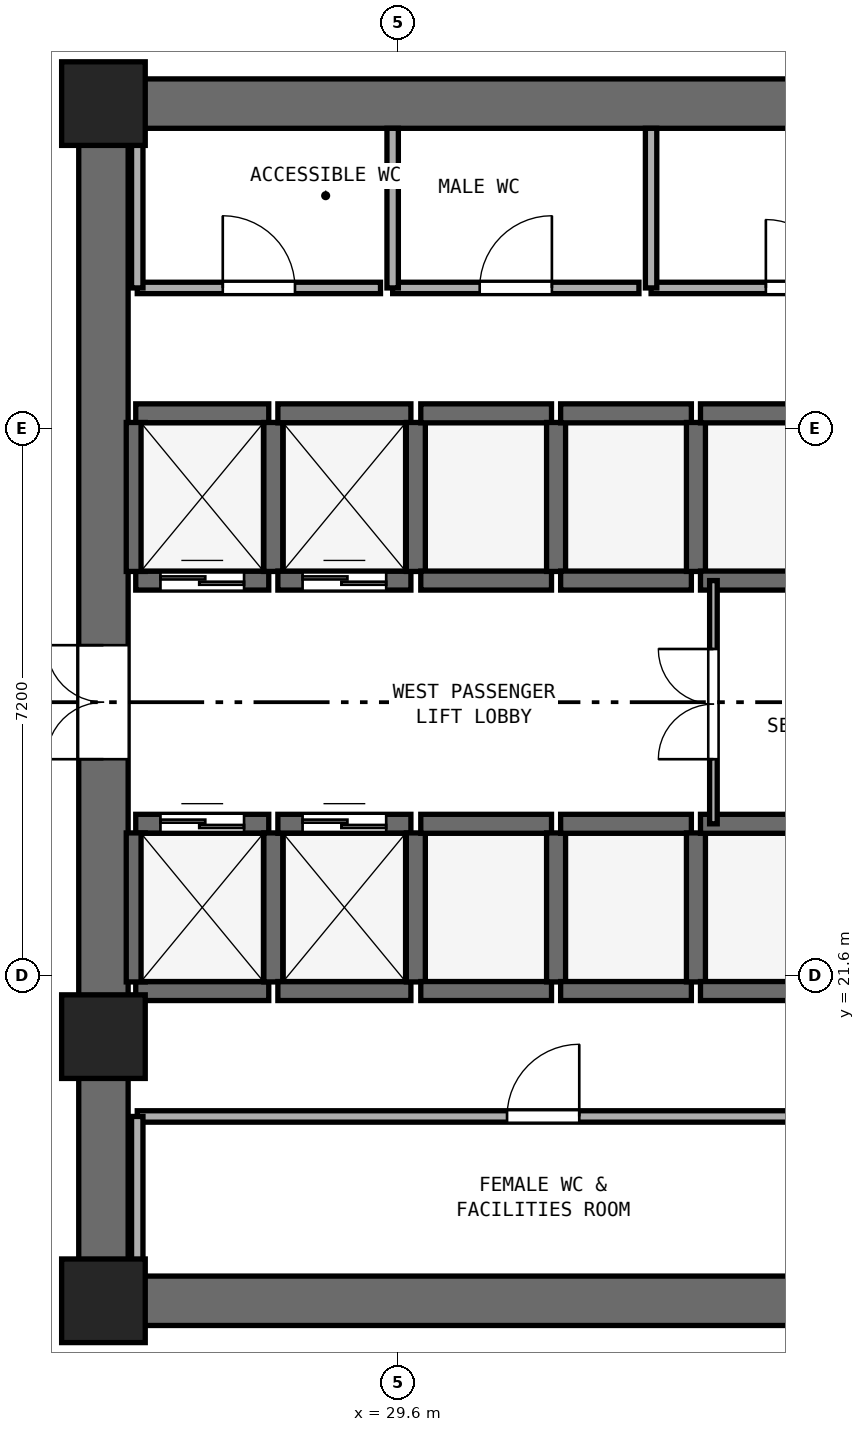
"""IFC4 building model, lengths in metres.
Left out: names, types, materials, properties, quantities, classifications, styles, units other than length and angle.
Written with IfcOpenShell. Run it as: python <this file> out.ifc"""

import sys

from ifc_helpers import new_model, si_unit, direction, frame, frame_2d, origin, origin_2d, place, context, subcontext, project, spatial, rectangle, extrude, element, fill, save


model = new_model("IFC4")
c1 = context("Model", 3, precision=1e-05, world=origin(), true_north=direction((0.0, 1.0)))
c2 = subcontext(c1, "Body", "Model", "MODEL_VIEW")
j1 = project(units=[si_unit("LENGTHUNIT", "METRE"), si_unit("PLANEANGLEUNIT", "RADIAN")], contexts=[c1])
p1 = place(None, origin())
s1 = spatial("IfcSite", under=j1, at=p1, CompositionType="ELEMENT")
p2 = place(p1, origin())
s2 = spatial("IfcBuilding", under=s1, at=p2, CompositionType="ELEMENT")
p3 = place(p2, frame((0.0, 0.0, 47.8)))
s3 = spatial("IfcBuildingStorey", under=s2, at=p3, CompositionType="ELEMENT", Elevation=47.8)
for number, where, z_axis, x_axis in (
    (1, (25.4, 17.325, 0.0), (0.0, 0.0, 1.0), (1.0, 0.0, 0.0)),
    (2, (25.4, 33.075, 0.0), (0.0, 0.0, 1.0), (1.0, 0.0, 0.0)),
):
    element("IfcWall", number, at=place(p3, frame(where, z_axis=z_axis, x_axis=x_axis)), inside=s3, PredefinedType="SHEAR", context=c2, shape_type="SweptSolid", body=[
        extrude(rectangle(XDim=23.2, YDim=0.65, at=frame_2d((11.6, 0.0))), origin(), (0.0, 0.0, 1.0), 3.525),
    ])
p4 = place(p3, frame((25.725, 17.65, 0.0), z_axis=(0.0, 0.0, 1.0), x_axis=(0.0, 1.0, 0.0)))
e3 = element("IfcWall", 3, at=p4, inside=s3, PredefinedType="SHEAR", context=c2, shape_type="SweptSolid", body=[
    extrude(rectangle(XDim=15.1, YDim=0.65, at=frame_2d((7.55, 0.0))), origin(), (0.0, 0.0, 1.0), 3.525),
])
p5 = place(p4, frame((6.8, 0.0, 0.0)))
e4 = element("IfcOpeningElement", 4, at=p5, cuts=e3, PredefinedType="OPENING", context=c2, shape_type="SweptSolid", body=[
    extrude(rectangle(XDim=1.5, YDim=2.15, at=frame_2d((0.75, 1.075))), frame((0.0, 0.335, 0.0), z_axis=(0.0, -1.0, 0.0), x_axis=(1.0, 0.0, 0.0)), (0.0, 0.0, 1.0), 0.67),
])
for number, where, z_axis, x_axis in (
    (5, (25.725, 17.325, 0.0), (0.0, 0.0, 1.0), (1.0, 0.0, 0.0)),
    (6, (25.725, 33.075, 0.0), (0.0, 0.0, 1.0), (1.0, 0.0, 0.0)),
    (7, (25.725, 20.8, 0.0), (0.0, 0.0, 1.0), (1.0, 0.0, 0.0)),
):
    element("IfcColumn", number, at=place(p3, frame(where, z_axis=z_axis, x_axis=x_axis)), inside=s3, PredefinedType="PILASTER", context=c2, shape_type="SweptSolid", body=[
        extrude(rectangle(XDim=1.1, YDim=1.1, at=origin_2d()), origin(), (0.0, 0.0, 1.0), 3.8),
    ])
p6 = place(p3, frame((26.15, 26.8, 0.0), z_axis=(0.0, 0.0, 1.0), x_axis=(1.0, 0.0, 0.0)))
e8 = element("IfcWall", 8, at=p6, inside=s3, PredefinedType="SHEAR", context=c2, shape_type="SweptSolid", body=[
    extrude(rectangle(XDim=1.75, YDim=0.25, at=frame_2d((0.875, 0.0))), origin(), (0.0, 0.0, 1.0), 3.525),
])
p7 = place(p6, frame((0.325, 0.0, 0.0)))
e9 = element("IfcOpeningElement", 9, at=p7, cuts=e8, PredefinedType="OPENING", context=c2, shape_type="SweptSolid", body=[
    extrude(rectangle(XDim=1.1, YDim=2.15, at=frame_2d((0.55, 1.075))), frame((0.0, 0.135, 0.0), z_axis=(0.0, -1.0, 0.0), x_axis=(1.0, 0.0, 0.0)), (0.0, 0.0, 1.0), 0.27),
])
p8 = place(p3, frame((26.15, 29.0, 0.0), z_axis=(0.0, 0.0, 1.0), x_axis=(1.0, 0.0, 0.0)))
e10 = element("IfcWall", 10, at=p8, inside=s3, PredefinedType="SHEAR", context=c2, shape_type="SweptSolid", body=[
    extrude(rectangle(XDim=1.75, YDim=0.25, at=frame_2d((0.875, 0.0))), origin(), (0.0, 0.0, 1.0), 3.525),
])
for number, where, z_axis, x_axis in (
    (11, (26.15, 26.92, 0.0), (0.0, 0.0, 1.0), (0.0, 1.0, 0.0)),
    (12, (27.96, 26.92, 0.0), (0.0, 0.0, 1.0), (0.0, 1.0, 0.0)),
):
    element("IfcWall", number, at=place(p3, frame(where, z_axis=z_axis, x_axis=x_axis)), inside=s3, PredefinedType="SHEAR", context=c2, shape_type="SweptSolid", body=[
        extrude(rectangle(XDim=1.96, YDim=0.25, at=frame_2d((0.98, 0.0))), origin(), (0.0, 0.0, 1.0), 3.525),
    ])
p9 = place(p3, frame((28.02, 26.8, 0.0), z_axis=(0.0, 0.0, 1.0), x_axis=(1.0, 0.0, 0.0)))
e13 = element("IfcWall", 13, at=p9, inside=s3, PredefinedType="SHEAR", context=c2, shape_type="SweptSolid", body=[
    extrude(rectangle(XDim=1.75, YDim=0.25, at=frame_2d((0.875, 0.0))), origin(), (0.0, 0.0, 1.0), 3.525),
])
p10 = place(p9, frame((0.325, 0.0, 0.0)))
e14 = element("IfcOpeningElement", 14, at=p10, cuts=e13, PredefinedType="OPENING", context=c2, shape_type="SweptSolid", body=[
    extrude(rectangle(XDim=1.1, YDim=2.15, at=frame_2d((0.55, 1.075))), frame((0.0, 0.135, 0.0), z_axis=(0.0, -1.0, 0.0), x_axis=(1.0, 0.0, 0.0)), (0.0, 0.0, 1.0), 0.27),
])
p11 = place(p3, frame((28.02, 29.0, 0.0), z_axis=(0.0, 0.0, 1.0), x_axis=(1.0, 0.0, 0.0)))
e15 = element("IfcWall", 15, at=p11, inside=s3, PredefinedType="SHEAR", context=c2, shape_type="SweptSolid", body=[
    extrude(rectangle(XDim=1.75, YDim=0.25, at=frame_2d((0.875, 0.0))), origin(), (0.0, 0.0, 1.0), 3.525),
])
p12 = place(p3, frame((29.835, 26.92, 0.0), z_axis=(0.0, 0.0, 1.0), x_axis=(0.0, 1.0, 0.0)))
e16 = element("IfcWall", 16, at=p12, inside=s3, PredefinedType="SHEAR", context=c2, shape_type="SweptSolid", body=[
    extrude(rectangle(XDim=1.96, YDim=0.25, at=frame_2d((0.98, 0.0))), origin(), (0.0, 0.0, 1.0), 3.525),
])
p13 = place(p3, frame((26.15, 21.4, 0.0), z_axis=(0.0, 0.0, 1.0), x_axis=(1.0, 0.0, 0.0)))
e17 = element("IfcWall", 17, at=p13, inside=s3, PredefinedType="SHEAR", context=c2, shape_type="SweptSolid", body=[
    extrude(rectangle(XDim=1.75, YDim=0.25, at=frame_2d((0.875, 0.0))), origin(), (0.0, 0.0, 1.0), 3.525),
])
p14 = place(p3, frame((26.15, 23.6, 0.0), z_axis=(0.0, 0.0, 1.0), x_axis=(1.0, 0.0, 0.0)))
e18 = element("IfcWall", 18, at=p14, inside=s3, PredefinedType="SHEAR", context=c2, shape_type="SweptSolid", body=[
    extrude(rectangle(XDim=1.75, YDim=0.25, at=frame_2d((0.875, 0.0))), origin(), (0.0, 0.0, 1.0), 3.525),
])
p15 = place(p14, frame((0.325, 0.0, 0.0)))
e19 = element("IfcOpeningElement", 19, at=p15, cuts=e18, PredefinedType="OPENING", context=c2, shape_type="SweptSolid", body=[
    extrude(rectangle(XDim=1.1, YDim=2.15, at=frame_2d((0.55, 1.075))), frame((0.0, 0.135, 0.0), z_axis=(0.0, -1.0, 0.0), x_axis=(1.0, 0.0, 0.0)), (0.0, 0.0, 1.0), 0.27),
])
for number, where, z_axis, x_axis in (
    (20, (26.15, 21.52, 0.0), (0.0, 0.0, 1.0), (0.0, 1.0, 0.0)),
    (21, (27.96, 21.52, 0.0), (0.0, 0.0, 1.0), (0.0, 1.0, 0.0)),
):
    element("IfcWall", number, at=place(p3, frame(where, z_axis=z_axis, x_axis=x_axis)), inside=s3, PredefinedType="SHEAR", context=c2, shape_type="SweptSolid", body=[
        extrude(rectangle(XDim=1.96, YDim=0.25, at=frame_2d((0.98, 0.0))), origin(), (0.0, 0.0, 1.0), 3.525),
    ])
p16 = place(p3, frame((28.02, 21.4, 0.0), z_axis=(0.0, 0.0, 1.0), x_axis=(1.0, 0.0, 0.0)))
e22 = element("IfcWall", 22, at=p16, inside=s3, PredefinedType="SHEAR", context=c2, shape_type="SweptSolid", body=[
    extrude(rectangle(XDim=1.75, YDim=0.25, at=frame_2d((0.875, 0.0))), origin(), (0.0, 0.0, 1.0), 3.525),
])
p17 = place(p3, frame((28.02, 23.6, 0.0), z_axis=(0.0, 0.0, 1.0), x_axis=(1.0, 0.0, 0.0)))
e23 = element("IfcWall", 23, at=p17, inside=s3, PredefinedType="SHEAR", context=c2, shape_type="SweptSolid", body=[
    extrude(rectangle(XDim=1.75, YDim=0.25, at=frame_2d((0.875, 0.0))), origin(), (0.0, 0.0, 1.0), 3.525),
])
p18 = place(p17, frame((0.325, 0.0, 0.0)))
e24 = element("IfcOpeningElement", 24, at=p18, cuts=e23, PredefinedType="OPENING", context=c2, shape_type="SweptSolid", body=[
    extrude(rectangle(XDim=1.1, YDim=2.15, at=frame_2d((0.55, 1.075))), frame((0.0, 0.135, 0.0), z_axis=(0.0, -1.0, 0.0), x_axis=(1.0, 0.0, 0.0)), (0.0, 0.0, 1.0), 0.27),
])
p19 = place(p3, frame((29.835, 21.52, 0.0), z_axis=(0.0, 0.0, 1.0), x_axis=(0.0, 1.0, 0.0)))
e25 = element("IfcWall", 25, at=p19, inside=s3, PredefinedType="SHEAR", context=c2, shape_type="SweptSolid", body=[
    extrude(rectangle(XDim=1.96, YDim=0.25, at=frame_2d((0.98, 0.0))), origin(), (0.0, 0.0, 1.0), 3.525),
])
for number, where, z_axis, x_axis in (
    (26, (29.9, 21.4, 0.0), (0.0, 0.0, 1.0), (1.0, 0.0, 0.0)),
    (27, (29.9, 23.6, 0.0), (0.0, 0.0, 1.0), (1.0, 0.0, 0.0)),
):
    element("IfcWall", number, at=place(p3, frame(where, z_axis=z_axis, x_axis=x_axis)), inside=s3, PredefinedType="SHEAR", context=c2, shape_type="SweptSolid", body=[
        extrude(rectangle(XDim=1.72, YDim=0.25, at=frame_2d((0.86, 0.0))), origin(), (0.0, 0.0, 1.0), 3.525),
    ])
p20 = place(p3, frame((31.68, 21.52, 0.0), z_axis=(0.0, 0.0, 1.0), x_axis=(0.0, 1.0, 0.0)))
e28 = element("IfcWall", 28, at=p20, inside=s3, PredefinedType="SHEAR", context=c2, shape_type="SweptSolid", body=[
    extrude(rectangle(XDim=1.96, YDim=0.25, at=frame_2d((0.98, 0.0))), origin(), (0.0, 0.0, 1.0), 3.525),
])
for number, where, z_axis, x_axis in (
    (29, (31.74, 21.4, 0.0), (0.0, 0.0, 1.0), (1.0, 0.0, 0.0)),
    (30, (31.74, 23.6, 0.0), (0.0, 0.0, 1.0), (1.0, 0.0, 0.0)),
):
    element("IfcWall", number, at=place(p3, frame(where, z_axis=z_axis, x_axis=x_axis)), inside=s3, PredefinedType="SHEAR", context=c2, shape_type="SweptSolid", body=[
        extrude(rectangle(XDim=1.72, YDim=0.25, at=frame_2d((0.86, 0.0))), origin(), (0.0, 0.0, 1.0), 3.525),
    ])
p21 = place(p3, frame((33.52, 21.52, 0.0), z_axis=(0.0, 0.0, 1.0), x_axis=(0.0, 1.0, 0.0)))
e31 = element("IfcWall", 31, at=p21, inside=s3, PredefinedType="SHEAR", context=c2, shape_type="SweptSolid", body=[
    extrude(rectangle(XDim=1.96, YDim=0.25, at=frame_2d((0.98, 0.0))), origin(), (0.0, 0.0, 1.0), 3.525),
])
for number, where, z_axis, x_axis in (
    (32, (33.58, 21.4, 0.0), (0.0, 0.0, 1.0), (1.0, 0.0, 0.0)),
    (33, (33.58, 23.6, 0.0), (0.0, 0.0, 1.0), (1.0, 0.0, 0.0)),
):
    element("IfcWall", number, at=place(p3, frame(where, z_axis=z_axis, x_axis=x_axis)), inside=s3, PredefinedType="SHEAR", context=c2, shape_type="SweptSolid", body=[
        extrude(rectangle(XDim=1.72, YDim=0.25, at=frame_2d((0.86, 0.0))), origin(), (0.0, 0.0, 1.0), 3.525),
    ])
for number, where, z_axis, x_axis in (
    (34, (29.9, 26.8, 0.0), (0.0, 0.0, 1.0), (1.0, 0.0, 0.0)),
    (35, (29.9, 29.0, 0.0), (0.0, 0.0, 1.0), (1.0, 0.0, 0.0)),
):
    element("IfcWall", number, at=place(p3, frame(where, z_axis=z_axis, x_axis=x_axis)), inside=s3, PredefinedType="SHEAR", context=c2, shape_type="SweptSolid", body=[
        extrude(rectangle(XDim=1.72, YDim=0.25, at=frame_2d((0.86, 0.0))), origin(), (0.0, 0.0, 1.0), 3.525),
    ])
p22 = place(p3, frame((31.68, 26.92, 0.0), z_axis=(0.0, 0.0, 1.0), x_axis=(0.0, 1.0, 0.0)))
e36 = element("IfcWall", 36, at=p22, inside=s3, PredefinedType="SHEAR", context=c2, shape_type="SweptSolid", body=[
    extrude(rectangle(XDim=1.96, YDim=0.25, at=frame_2d((0.98, 0.0))), origin(), (0.0, 0.0, 1.0), 3.525),
])
for number, where, z_axis, x_axis in (
    (37, (31.74, 26.8, 0.0), (0.0, 0.0, 1.0), (1.0, 0.0, 0.0)),
    (38, (31.74, 29.0, 0.0), (0.0, 0.0, 1.0), (1.0, 0.0, 0.0)),
):
    element("IfcWall", number, at=place(p3, frame(where, z_axis=z_axis, x_axis=x_axis)), inside=s3, PredefinedType="SHEAR", context=c2, shape_type="SweptSolid", body=[
        extrude(rectangle(XDim=1.72, YDim=0.25, at=frame_2d((0.86, 0.0))), origin(), (0.0, 0.0, 1.0), 3.525),
    ])
p23 = place(p3, frame((33.52, 26.92, 0.0), z_axis=(0.0, 0.0, 1.0), x_axis=(0.0, 1.0, 0.0)))
e39 = element("IfcWall", 39, at=p23, inside=s3, PredefinedType="SHEAR", context=c2, shape_type="SweptSolid", body=[
    extrude(rectangle(XDim=1.96, YDim=0.25, at=frame_2d((0.98, 0.0))), origin(), (0.0, 0.0, 1.0), 3.525),
])
for number, where, z_axis, x_axis in (
    (40, (33.58, 26.8, 0.0), (0.0, 0.0, 1.0), (1.0, 0.0, 0.0)),
    (41, (33.58, 29.0, 0.0), (0.0, 0.0, 1.0), (1.0, 0.0, 0.0)),
):
    element("IfcWall", number, at=place(p3, frame(where, z_axis=z_axis, x_axis=x_axis)), inside=s3, PredefinedType="SHEAR", context=c2, shape_type="SweptSolid", body=[
        extrude(rectangle(XDim=1.72, YDim=0.25, at=frame_2d((0.86, 0.0))), origin(), (0.0, 0.0, 1.0), 3.525),
    ])
p24 = place(p3, frame((26.17, 30.65, 0.0), z_axis=(0.0, 0.0, 1.0), x_axis=(1.0, 0.0, 0.0)))
e42 = element("IfcWall", 42, at=p24, inside=s3, PredefinedType="PARTITIONING", context=c2, shape_type="SweptSolid", body=[
    extrude(rectangle(XDim=3.2, YDim=0.15, at=frame_2d((1.6, 0.0))), origin(), (0.0, 0.0, 1.0), 3.525),
])
p25 = place(p24, frame((1.125, 0.0, 0.0)))
e43 = element("IfcOpeningElement", 43, at=p25, cuts=e42, PredefinedType="OPENING", context=c2, shape_type="SweptSolid", body=[
    extrude(rectangle(XDim=0.95, YDim=2.1, at=frame_2d((0.475, 1.05))), frame((0.0, 0.085, 0.0), z_axis=(0.0, -1.0, 0.0), x_axis=(1.0, 0.0, 0.0)), (0.0, 0.0, 1.0), 0.17),
])
p26 = place(p3, frame((26.17, 30.65, 0.0), z_axis=(0.0, 0.0, 1.0), x_axis=(0.0, 1.0, 0.0)))
e44 = element("IfcWall", 44, at=p26, inside=s3, PredefinedType="PARTITIONING", context=c2, shape_type="SweptSolid", body=[
    extrude(rectangle(XDim=2.1, YDim=0.15, at=frame_2d((1.05, 0.0))), origin(), (0.0, 0.0, 1.0), 3.525),
])
p27 = place(p3, frame((29.53, 30.65, 0.0), z_axis=(0.0, 0.0, 1.0), x_axis=(1.0, 0.0, 0.0)))
e45 = element("IfcWall", 45, at=p27, inside=s3, PredefinedType="PARTITIONING", context=c2, shape_type="SweptSolid", body=[
    extrude(rectangle(XDim=3.24, YDim=0.15, at=frame_2d((1.62, 0.0))), origin(), (0.0, 0.0, 1.0), 3.525),
])
p28 = place(p27, frame((1.145, 0.0, 0.0)))
e46 = element("IfcOpeningElement", 46, at=p28, cuts=e45, PredefinedType="OPENING", context=c2, shape_type="SweptSolid", body=[
    extrude(rectangle(XDim=0.95, YDim=2.1, at=frame_2d((0.475, 1.05))), frame((0.0, 0.085, 0.0), z_axis=(0.0, -1.0, 0.0), x_axis=(1.0, 0.0, 0.0)), (0.0, 0.0, 1.0), 0.17),
])
p29 = place(p3, frame((29.53, 30.65, 0.0), z_axis=(0.0, 0.0, 1.0), x_axis=(0.0, 1.0, 0.0)))
e47 = element("IfcWall", 47, at=p29, inside=s3, PredefinedType="PARTITIONING", context=c2, shape_type="SweptSolid", body=[
    extrude(rectangle(XDim=2.1, YDim=0.15, at=frame_2d((1.05, 0.0))), origin(), (0.0, 0.0, 1.0), 3.525),
])
p30 = place(p3, frame((32.93, 30.65, 0.0), z_axis=(0.0, 0.0, 1.0), x_axis=(1.0, 0.0, 0.0)))
e48 = element("IfcWall", 48, at=p30, inside=s3, PredefinedType="PARTITIONING", context=c2, shape_type="SweptSolid", body=[
    extrude(rectangle(XDim=3.92, YDim=0.15, at=frame_2d((1.96, 0.0))), origin(), (0.0, 0.0, 1.0), 3.525),
])
p31 = place(p30, frame((1.51, 0.0, 0.0)))
e49 = element("IfcOpeningElement", 49, at=p31, cuts=e48, PredefinedType="OPENING", context=c2, shape_type="SweptSolid", body=[
    extrude(rectangle(XDim=0.9, YDim=2.1, at=frame_2d((0.45, 1.05))), frame((0.0, 0.085, 0.0), z_axis=(0.0, -1.0, 0.0), x_axis=(1.0, 0.0, 0.0)), (0.0, 0.0, 1.0), 0.17),
])
p32 = place(p3, frame((32.93, 30.65, 0.0), z_axis=(0.0, 0.0, 1.0), x_axis=(0.0, 1.0, 0.0)))
e50 = element("IfcWall", 50, at=p32, inside=s3, PredefinedType="PARTITIONING", context=c2, shape_type="SweptSolid", body=[
    extrude(rectangle(XDim=2.1, YDim=0.15, at=frame_2d((1.05, 0.0))), origin(), (0.0, 0.0, 1.0), 3.525),
])
p33 = place(p3, frame((26.17, 19.75, 0.0), z_axis=(0.0, 0.0, 1.0), x_axis=(1.0, 0.0, 0.0)))
e51 = element("IfcWall", 51, at=p33, inside=s3, PredefinedType="PARTITIONING", context=c2, shape_type="SweptSolid", body=[
    extrude(rectangle(XDim=10.68, YDim=0.15, at=frame_2d((5.34, 0.0))), origin(), (0.0, 0.0, 1.0), 3.525),
])
p34 = place(p33, frame((4.865, 0.0, 0.0)))
e52 = element("IfcOpeningElement", 52, at=p34, cuts=e51, PredefinedType="OPENING", context=c2, shape_type="SweptSolid", body=[
    extrude(rectangle(XDim=0.95, YDim=2.1, at=frame_2d((0.475, 1.05))), frame((0.0, 0.085, 0.0), z_axis=(0.0, -1.0, 0.0), x_axis=(1.0, 0.0, 0.0)), (0.0, 0.0, 1.0), 0.17),
])
p35 = place(p3, frame((26.17, 17.65, 0.0), z_axis=(0.0, 0.0, 1.0), x_axis=(0.0, 1.0, 0.0)))
e53 = element("IfcWall", 53, at=p35, inside=s3, PredefinedType="PARTITIONING", context=c2, shape_type="SweptSolid", body=[
    extrude(rectangle(XDim=2.1, YDim=0.15, at=frame_2d((1.05, 0.0))), origin(), (0.0, 0.0, 1.0), 3.525),
])
p36 = place(p3, frame((33.75, 23.6, 0.0), z_axis=(0.0, 0.0, 1.0), x_axis=(0.0, 1.0, 0.0)))
e54 = element("IfcWall", 54, at=p36, inside=s3, PredefinedType="PARTITIONING", context=c2, shape_type="SweptSolid", body=[
    extrude(rectangle(XDim=3.2, YDim=0.1, at=frame_2d((1.6, 0.0))), origin(), (0.0, 0.0, 1.0), 3.525),
])
p37 = place(p36, frame((0.85, 0.0, 0.0)))
e55 = element("IfcOpeningElement", 55, at=p37, cuts=e54, PredefinedType="OPENING", context=c2, shape_type="SweptSolid", body=[
    extrude(rectangle(XDim=1.45, YDim=2.12, at=frame_2d((0.725, 1.06))), frame((0.0, 0.06, 0.0), z_axis=(0.0, -1.0, 0.0), x_axis=(1.0, 0.0, 0.0)), (0.0, 0.0, 1.0), 0.12),
])
p38 = place(p7, origin())
e56 = element("IfcDoor", 56, at=p38, inside=s3, OperationType="DOUBLE_DOOR_SLIDING", PredefinedType="DOOR", context=c2, shape_type="SweptSolid", body=[
    extrude(rectangle(XDim=1.1, YDim=2.15, at=frame_2d((0.55, 1.075))), frame((0.0, 0.025, 0.0), z_axis=(0.0, -1.0, 0.0), x_axis=(1.0, 0.0, 0.0)), (0.0, 0.0, 1.0), 0.05),
])
fill(e9, e56)
p39 = place(p10, origin())
e57 = element("IfcDoor", 57, at=p39, inside=s3, OperationType="DOUBLE_DOOR_SLIDING", PredefinedType="DOOR", context=c2, shape_type="SweptSolid", body=[
    extrude(rectangle(XDim=1.1, YDim=2.15, at=frame_2d((0.55, 1.075))), frame((0.0, 0.025, 0.0), z_axis=(0.0, -1.0, 0.0), x_axis=(1.0, 0.0, 0.0)), (0.0, 0.0, 1.0), 0.05),
])
fill(e14, e57)
p40 = place(p15, origin())
e58 = element("IfcDoor", 58, at=p40, inside=s3, OperationType="DOUBLE_DOOR_SLIDING", PredefinedType="DOOR", context=c2, shape_type="SweptSolid", body=[
    extrude(rectangle(XDim=1.1, YDim=2.15, at=frame_2d((0.55, 1.075))), frame((0.0, 0.025, 0.0), z_axis=(0.0, -1.0, 0.0), x_axis=(1.0, 0.0, 0.0)), (0.0, 0.0, 1.0), 0.05),
])
fill(e19, e58)
p41 = place(p18, origin())
e59 = element("IfcDoor", 59, at=p41, inside=s3, OperationType="DOUBLE_DOOR_SLIDING", PredefinedType="DOOR", context=c2, shape_type="SweptSolid", body=[
    extrude(rectangle(XDim=1.1, YDim=2.15, at=frame_2d((0.55, 1.075))), frame((0.0, 0.025, 0.0), z_axis=(0.0, -1.0, 0.0), x_axis=(1.0, 0.0, 0.0)), (0.0, 0.0, 1.0), 0.05),
])
fill(e24, e59)
p42 = place(p5, origin())
e60 = element("IfcDoor", 60, at=p42, inside=s3, OperationType="DOUBLE_DOOR_SINGLE_SWING", PredefinedType="DOOR", context=c2, shape_type="SweptSolid", body=[
    extrude(rectangle(XDim=1.5, YDim=2.15, at=frame_2d((0.75, 1.075))), frame((0.0, 0.025, 0.0), z_axis=(0.0, -1.0, 0.0), x_axis=(1.0, 0.0, 0.0)), (0.0, 0.0, 1.0), 0.05),
])
fill(e4, e60)
p43 = place(p25, origin())
e61 = element("IfcDoor", 61, at=p43, inside=s3, OperationType="SINGLE_SWING_LEFT", PredefinedType="DOOR", context=c2, shape_type="SweptSolid", body=[
    extrude(rectangle(XDim=0.95, YDim=2.1, at=frame_2d((0.475, 1.05))), frame((0.0, 0.025, 0.0), z_axis=(0.0, -1.0, 0.0), x_axis=(1.0, 0.0, 0.0)), (0.0, 0.0, 1.0), 0.05),
])
fill(e43, e61)
p44 = place(p28, origin())
e62 = element("IfcDoor", 62, at=p44, inside=s3, OperationType="SINGLE_SWING_RIGHT", PredefinedType="DOOR", context=c2, shape_type="SweptSolid", body=[
    extrude(rectangle(XDim=0.95, YDim=2.1, at=frame_2d((0.475, 1.05))), frame((0.0, 0.025, 0.0), z_axis=(0.0, -1.0, 0.0), x_axis=(1.0, 0.0, 0.0)), (0.0, 0.0, 1.0), 0.05),
])
fill(e46, e62)
p45 = place(p31, origin())
e63 = element("IfcDoor", 63, at=p45, inside=s3, OperationType="SINGLE_SWING_LEFT", PredefinedType="DOOR", context=c2, shape_type="SweptSolid", body=[
    extrude(rectangle(XDim=0.9, YDim=2.1, at=frame_2d((0.45, 1.05))), frame((0.0, 0.025, 0.0), z_axis=(0.0, -1.0, 0.0), x_axis=(1.0, 0.0, 0.0)), (0.0, 0.0, 1.0), 0.05),
])
fill(e49, e63)
p46 = place(p34, origin())
e64 = element("IfcDoor", 64, at=p46, inside=s3, OperationType="SINGLE_SWING_RIGHT", PredefinedType="DOOR", context=c2, shape_type="SweptSolid", body=[
    extrude(rectangle(XDim=0.95, YDim=2.1, at=frame_2d((0.475, 1.05))), frame((0.0, 0.025, 0.0), z_axis=(0.0, -1.0, 0.0), x_axis=(1.0, 0.0, 0.0)), (0.0, 0.0, 1.0), 0.05),
])
fill(e52, e64)
p47 = place(p37, origin())
e65 = element("IfcDoor", 65, at=p47, inside=s3, OperationType="DOUBLE_DOOR_SINGLE_SWING", PredefinedType="DOOR", context=c2, shape_type="SweptSolid", body=[
    extrude(rectangle(XDim=1.45, YDim=2.12, at=frame_2d((0.725, 1.06))), frame((0.0, 0.025, 0.0), z_axis=(0.0, -1.0, 0.0), x_axis=(1.0, 0.0, 0.0)), (0.0, 0.0, 1.0), 0.05),
])
fill(e55, e65)
save(model, sys.argv[1])
